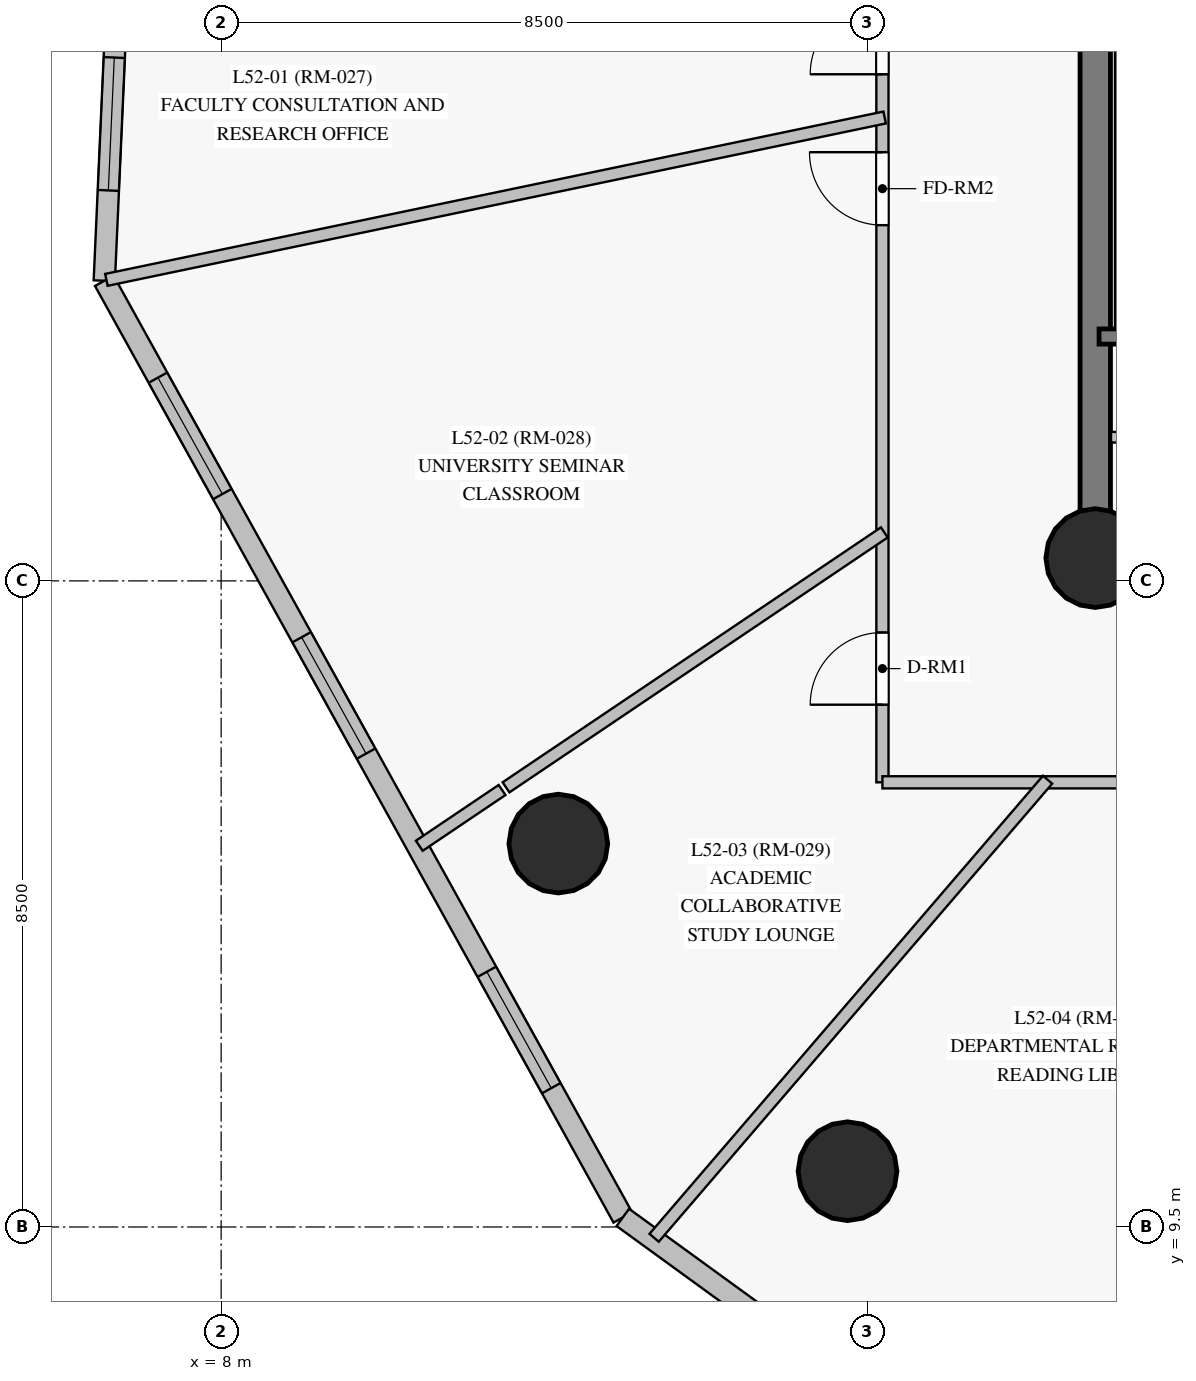
"""IFC4 building model, lengths in metres.
Left out: names, types, materials, properties, quantities, classifications, styles, units other than length and angle.
Written with IfcOpenShell. Run it as: python <this file> out.ifc"""

import sys

from ifc_helpers import new_model, si_unit, direction, frame, frame_2d, origin, origin_with_axes, origin_2d, place, context, subcontext, project, spatial, rectangle, circle, extrude, source, transform, mapped, element, fill, save


model = new_model("IFC4")
c1 = context("Model", 3, precision=1e-05, world=origin(), true_north=direction((0.0, 1.0)))
c2 = subcontext(c1, "Body", "Model", "MODEL_VIEW")
j1 = project(units=[si_unit("LENGTHUNIT", "METRE"), si_unit("PLANEANGLEUNIT", "RADIAN")], contexts=[c1])
p1 = place(None, origin())
s1 = spatial("IfcSite", under=j1, at=p1, CompositionType="ELEMENT")
p2 = place(p1, origin())
s2 = spatial("IfcBuilding", under=s1, at=p2, CompositionType="ELEMENT")
p3 = place(p2, frame((0.0, 0.0, 180.95)))
s3 = spatial("IfcBuildingStorey", under=s2, at=p3, CompositionType="ELEMENT", Elevation=180.95)
p4 = place(p3, frame((19.5, 18.3, 0.0), z_axis=(0.0, 0.0, 1.0), x_axis=(1.0, 0.0, 0.0)))
e1 = element("IfcWall", 1, at=p4, inside=s3, PredefinedType="SHEAR", context=c2, shape_type="SweptSolid", body=[
    extrude(rectangle(XDim=7.05, YDim=0.4, at=frame_2d((3.525, 0.0))), origin(), (0.0, 0.0, 1.0), 2.825),
])
p5 = place(p4, frame((4.2, 0.0, 0.0)))
e2 = element("IfcOpeningElement", 2, at=p5, cuts=e1, PredefinedType="OPENING", context=c2, shape_type="SweptSolid", body=[
    extrude(rectangle(XDim=1.4, YDim=2.2, at=frame_2d((0.7, 1.1))), frame((0.0, 0.21, 0.0), z_axis=(0.0, -1.0, 0.0), x_axis=(1.0, 0.0, 0.0)), (0.0, 0.0, 1.0), 0.42),
])
p6 = place(p3, frame((19.5, 34.7, 0.0), z_axis=(0.0, 0.0, 1.0), x_axis=(0.0, -1.0, 0.0)))
e3 = element("IfcWall", 3, at=p6, inside=s3, PredefinedType="SHEAR", context=c2, shape_type="SweptSolid", body=[
    extrude(rectangle(XDim=16.4, YDim=0.4, at=frame_2d((8.2, 0.0))), origin(), (0.0, 0.0, 1.0), 2.825),
])
p7 = place(p6, frame((3.1, 0.0, 0.0)))
e4 = element("IfcOpeningElement", 4, at=p7, cuts=e3, PredefinedType="OPENING", context=c2, shape_type="SweptSolid", body=[
    extrude(rectangle(XDim=1.1, YDim=2.15, at=frame_2d((0.55, 1.075))), frame((0.0, 0.21, 0.0), z_axis=(0.0, -1.0, 0.0), x_axis=(1.0, 0.0, 0.0)), (0.0, 0.0, 1.0), 0.42),
])
m1 = source(origin_with_axes(), c2, "Body", "SweptSolid", [
    extrude(circle(Radius=0.65, at=origin_2d()), origin(), (0.0, 0.0, 1.0), 3.05),
])
for number, where, z_axis, x_axis in (
    (5, (19.5, 18.3, 0.0), (0.0, 0.0, 1.0), (1.0, 0.0, 0.0)),
    (6, (12.436, 14.544, 0.0), (0.0, 0.0, 1.0), (1.0, 0.0, 0.0)),
    (7, (16.241, 10.234, 0.0), (0.0, 0.0, 1.0), (1.0, 0.0, 0.0)),
):
    element("IfcColumn", number, at=place(p3, frame(where, z_axis=z_axis, x_axis=x_axis)), inside=s3, PredefinedType="COLUMN", context=c2, shape_type="MappedRepresentation", body=[
        mapped(m1, transform((0.0, 0.0, 0.0), scale=1.0)),
    ])
p8 = place(p3, frame((6.957, 33.0, 0.0), z_axis=(0.0, 0.0, 1.0), x_axis=(-0.04466588637, -0.999001981277, 0.0)))
e8 = element("IfcWall", 8, at=p8, inside=s3, PredefinedType="SOLIDWALL", context=c2, shape_type="SweptSolid", body=[
    extrude(rectangle(XDim=11.063, YDim=0.28, at=frame_2d((5.531, 0.0))), origin(), (0.0, 0.0, 1.0), 2.825),
])
p9 = place(p8, frame((3.242, 0.0, 0.85)))
e9 = element("IfcOpeningElement", 9, at=p9, cuts=e8, PredefinedType="OPENING", context=c2, shape_type="SweptSolid", body=[
    extrude(rectangle(XDim=1.75, YDim=1.65, at=frame_2d((0.875, 0.825))), frame((0.0, 0.15, 0.0), z_axis=(0.0, -1.0, 0.0), x_axis=(1.0, 0.0, 0.0)), (0.0, 0.0, 1.0), 0.3),
])
p10 = place(p8, frame((8.123, 0.0, 0.85)))
e10 = element("IfcOpeningElement", 10, at=p10, cuts=e8, PredefinedType="OPENING", context=c2, shape_type="SweptSolid", body=[
    extrude(rectangle(XDim=1.75, YDim=1.65, at=frame_2d((0.875, 0.825))), frame((0.0, 0.15, 0.0), z_axis=(0.0, -1.0, 0.0), x_axis=(1.0, 0.0, 0.0)), (0.0, 0.0, 1.0), 0.3),
])
p11 = place(p3, frame((6.463, 21.948, 0.0), z_axis=(0.0, 0.0, 1.0), x_axis=(0.484331046547, -0.874884813762, 0.0)))
e11 = element("IfcWall", 11, at=p11, inside=s3, PredefinedType="SOLIDWALL", context=c2, shape_type="SweptSolid", body=[
    extrude(rectangle(XDim=14.084, YDim=0.28, at=frame_2d((7.042, 0.0))), origin(), (0.0, 0.0, 1.0), 2.825),
])
p12 = place(p11, frame((1.457, 0.0, 0.85)))
e12 = element("IfcOpeningElement", 12, at=p12, cuts=e11, PredefinedType="OPENING", context=c2, shape_type="SweptSolid", body=[
    extrude(rectangle(XDim=1.75, YDim=1.65, at=frame_2d((0.875, 0.825))), frame((0.0, 0.15, 0.0), z_axis=(0.0, -1.0, 0.0), x_axis=(1.0, 0.0, 0.0)), (0.0, 0.0, 1.0), 0.3),
])
p13 = place(p11, frame((5.36, 0.0, 0.85)))
e13 = element("IfcOpeningElement", 13, at=p13, cuts=e11, PredefinedType="OPENING", context=c2, shape_type="SweptSolid", body=[
    extrude(rectangle(XDim=1.75, YDim=1.65, at=frame_2d((0.875, 0.825))), frame((0.0, 0.15, 0.0), z_axis=(0.0, -1.0, 0.0), x_axis=(1.0, 0.0, 0.0)), (0.0, 0.0, 1.0), 0.3),
])
p14 = place(p11, frame((10.391, 0.0, 0.85)))
e14 = element("IfcOpeningElement", 14, at=p14, cuts=e11, PredefinedType="OPENING", context=c2, shape_type="SweptSolid", body=[
    extrude(rectangle(XDim=1.75, YDim=1.65, at=frame_2d((0.875, 0.825))), frame((0.0, 0.15, 0.0), z_axis=(0.0, -1.0, 0.0), x_axis=(1.0, 0.0, 0.0)), (0.0, 0.0, 1.0), 0.3),
])
p15 = place(p3, frame((13.284, 9.626, 0.0), z_axis=(0.0, 0.0, 1.0), x_axis=(0.8089753159, -0.587842613516, 0.0)))
e15 = element("IfcWall", 15, at=p15, inside=s3, PredefinedType="SOLIDWALL", context=c2, shape_type="SweptSolid", body=[
    extrude(rectangle(XDim=10.059, YDim=0.28, at=frame_2d((5.03, 0.0))), origin(), (0.0, 0.0, 1.0), 2.825),
])
p16 = place(p15, frame((3.076, 0.0, 0.85)))
e16 = element("IfcOpeningElement", 16, at=p16, cuts=e15, PredefinedType="OPENING", context=c2, shape_type="SweptSolid", body=[
    extrude(rectangle(XDim=1.75, YDim=1.65, at=frame_2d((0.875, 0.825))), frame((0.0, 0.15, 0.0), z_axis=(0.0, -1.0, 0.0), x_axis=(1.0, 0.0, 0.0)), (0.0, 0.0, 1.0), 0.3),
])
p17 = place(p15, frame((7.929, 0.0, 0.85)))
e17 = element("IfcOpeningElement", 17, at=p17, cuts=e15, PredefinedType="OPENING", context=c2, shape_type="SweptSolid", body=[
    extrude(rectangle(XDim=1.55, YDim=1.65, at=frame_2d((0.775, 0.825))), frame((0.0, 0.15, 0.0), z_axis=(0.0, -1.0, 0.0), x_axis=(1.0, 0.0, 0.0)), (0.0, 0.0, 1.0), 0.3),
])
p18 = place(p3, frame((19.55, 21.215, 0.0), z_axis=(0.0, 0.0, 1.0), x_axis=(1.0, 0.0, 0.0)))
e18 = element("IfcWall", 18, at=p18, inside=s3, PredefinedType="SHEAR", context=c2, shape_type="SweptSolid", body=[
    extrude(rectangle(XDim=3.995, YDim=0.2, at=frame_2d((1.998, 0.0))), origin(), (0.0, 0.0, 1.0), 2.825),
])
p19 = place(p3, frame((16.7, 15.35, 0.0), z_axis=(0.0, 0.0, 1.0), x_axis=(0.0, 1.0, 0.0)))
e19 = element("IfcWall", 19, at=p19, inside=s3, PredefinedType="PARTITIONING", context=c2, shape_type="SweptSolid", body=[
    extrude(rectangle(XDim=22.3, YDim=0.16, at=frame_2d((11.15, 0.0))), origin(), (0.0, 0.0, 1.0), 2.275),
])
p20 = place(p19, frame((9.315, 0.0, 0.0)))
e20 = element("IfcOpeningElement", 20, at=p20, cuts=e19, PredefinedType="OPENING", context=c2, shape_type="SweptSolid", body=[
    extrude(rectangle(XDim=0.95, YDim=2.15, at=frame_2d((0.475, 1.075))), frame((0.0, 0.09, 0.0), z_axis=(0.0, -1.0, 0.0), x_axis=(1.0, 0.0, 0.0)), (0.0, 0.0, 1.0), 0.18),
])
p21 = place(p19, frame((7.33, 0.0, 0.0)))
e21 = element("IfcOpeningElement", 21, at=p21, cuts=e19, PredefinedType="OPENING", context=c2, shape_type="SweptSolid", body=[
    extrude(rectangle(XDim=0.96, YDim=2.15, at=frame_2d((0.48, 1.075))), frame((0.0, 0.09, 0.0), z_axis=(0.0, -1.0, 0.0), x_axis=(1.0, 0.0, 0.0)), (0.0, 0.0, 1.0), 0.18),
])
p22 = place(p19, frame((1.021, 0.0, 0.0)))
e22 = element("IfcOpeningElement", 22, at=p22, cuts=e19, PredefinedType="OPENING", context=c2, shape_type="SweptSolid", body=[
    extrude(rectangle(XDim=0.95, YDim=2.15, at=frame_2d((0.475, 1.075))), frame((0.0, 0.09, 0.0), z_axis=(0.0, -1.0, 0.0), x_axis=(1.0, 0.0, 0.0)), (0.0, 0.0, 1.0), 0.18),
])
p23 = place(p19, frame((18.396, 0.0, 0.0)))
e23 = element("IfcOpeningElement", 23, at=p23, cuts=e19, PredefinedType="OPENING", context=c2, shape_type="SweptSolid", body=[
    extrude(rectangle(XDim=0.96, YDim=2.15, at=frame_2d((0.48, 1.075))), frame((0.0, 0.09, 0.0), z_axis=(0.0, -1.0, 0.0), x_axis=(1.0, 0.0, 0.0)), (0.0, 0.0, 1.0), 0.18),
])
p24 = place(p19, frame((14.36, 0.0, 0.0)))
e24 = element("IfcOpeningElement", 24, at=p24, cuts=e19, PredefinedType="OPENING", context=c2, shape_type="SweptSolid", body=[
    extrude(rectangle(XDim=0.96, YDim=2.15, at=frame_2d((0.48, 1.075))), frame((0.0, 0.09, 0.0), z_axis=(0.0, -1.0, 0.0), x_axis=(1.0, 0.0, 0.0)), (0.0, 0.0, 1.0), 0.18),
])
p25 = place(p19, frame((11.115, 0.0, 0.0)))
e25 = element("IfcOpeningElement", 25, at=p25, cuts=e19, PredefinedType="OPENING", context=c2, shape_type="SweptSolid", body=[
    extrude(rectangle(XDim=0.95, YDim=2.15, at=frame_2d((0.475, 1.075))), frame((0.0, 0.09, 0.0), z_axis=(0.0, -1.0, 0.0), x_axis=(1.0, 0.0, 0.0)), (0.0, 0.0, 1.0), 0.18),
])
p26 = place(p3, frame((23.645, 15.378, 0.0), z_axis=(0.0, 0.0, 1.0), x_axis=(-0.39550652106, -0.91846316845, 0.0)))
e26 = element("IfcWall", 26, at=p26, inside=s3, PredefinedType="PARTITIONING", context=c2, shape_type="SweptSolid", body=[
    extrude(rectangle(XDim=10.986, YDim=0.16, at=frame_2d((5.493, 0.0))), origin(), (0.0, 0.0, 1.0), 2.825),
])
p27 = place(p3, frame((27.55, 15.35, 0.0), z_axis=(0.0, 0.0, 1.0), x_axis=(-1.0, 0.0, 0.0)))
e27 = element("IfcWall", 27, at=p27, inside=s3, PredefinedType="PARTITIONING", context=c2, shape_type="SweptSolid", body=[
    extrude(rectangle(XDim=10.85, YDim=0.16, at=frame_2d((5.425, 0.0))), origin(), (0.0, 0.0, 1.0), 2.375),
])
p28 = place(p27, frame((4.95, 0.0, 0.0)))
e28 = element("IfcOpeningElement", 28, at=p28, cuts=e27, PredefinedType="OPENING", context=c2, shape_type="SweptSolid", body=[
    extrude(rectangle(XDim=0.95, YDim=2.15, at=frame_2d((0.475, 1.075))), frame((0.0, 0.09, 0.0), z_axis=(0.0, -1.0, 0.0), x_axis=(1.0, 0.0, 0.0)), (0.0, 0.0, 1.0), 0.18),
])
p29 = place(p27, frame((2.683, 0.0, 0.0)))
e29 = element("IfcOpeningElement", 29, at=p29, cuts=e27, PredefinedType="OPENING", context=c2, shape_type="SweptSolid", body=[
    extrude(rectangle(XDim=0.96, YDim=2.15, at=frame_2d((0.48, 1.075))), frame((0.0, 0.09, 0.0), z_axis=(0.0, -1.0, 0.0), x_axis=(1.0, 0.0, 0.0)), (0.0, 0.0, 1.0), 0.18),
])
p30 = place(p3, frame((16.729, 24.096, 0.0), z_axis=(0.0, 0.0, 1.0), x_axis=(-0.978925817261, -0.204216170515, 0.0)))
e30 = element("IfcWall", 30, at=p30, inside=s3, PredefinedType="PARTITIONING", context=c2, shape_type="SweptSolid", body=[
    extrude(rectangle(XDim=10.459, YDim=0.16, at=frame_2d((5.23, 0.0))), origin(), (0.0, 0.0, 1.0), 2.825),
])
p31 = place(p3, frame((18.873, 15.384, 0.0), z_axis=(0.0, 0.0, 1.0), x_axis=(-0.651578085273, -0.758581570295, 0.0)))
e31 = element("IfcWall", 31, at=p31, inside=s3, PredefinedType="PARTITIONING", context=c2, shape_type="SweptSolid", body=[
    extrude(rectangle(XDim=7.945, YDim=0.16, at=frame_2d((3.972, 0.0))), origin(), (0.0, 0.0, 1.0), 2.275),
])
p32 = place(p3, frame((16.725, 18.638, 0.0), z_axis=(0.0, 0.0, 1.0), x_axis=(-0.829279952389, -0.558833392493, 0.0)))
e32 = element("IfcWall", 32, at=p32, inside=s3, PredefinedType="PARTITIONING", context=c2, shape_type="SweptSolid", body=[
    extrude(rectangle(XDim=6.001, YDim=0.16, at=frame_2d((3.001, 0.0))), origin(), (0.0, 0.0, 1.0), 2.825),
])
p33 = place(p3, frame((19.707, 19.89, 0.0), z_axis=(0.0, 0.0, 1.0), x_axis=(1.0, 0.0, 0.0)))
e33 = element("IfcWall", 33, at=p33, inside=s3, PredefinedType="PARTITIONING", context=c2, shape_type="SweptSolid", body=[
    extrude(rectangle(XDim=3.79, YDim=0.14, at=frame_2d((1.895, 0.0))), origin(), (0.0, 0.0, 1.0), 2.825),
])
p34 = place(p3, frame((11.696, 15.249, 0.0), z_axis=(0.0, 0.0, 1.0), x_axis=(-0.829266427591, -0.558853462072, 0.0)))
e34 = element("IfcWall", 34, at=p34, inside=s3, PredefinedType="PARTITIONING", context=c2, shape_type="SweptSolid", body=[
    extrude(rectangle(XDim=1.314, YDim=0.16, at=frame_2d((0.657, 0.0))), origin(), (0.0, 0.0, 1.0), 2.825),
])
m2 = source(origin_with_axes(), c2, "Body", "SweptSolid", [
    extrude(rectangle(XDim=1.75, YDim=1.65, at=frame_2d((0.875, 0.825))), frame((0.0, 0.03, 0.0), z_axis=(0.0, -1.0, 0.0), x_axis=(1.0, 0.0, 0.0)), (0.0, 0.0, 1.0), 0.06),
])
p35 = place(p10, origin())
e35 = element("IfcWindow", 35, at=p35, inside=s3, PartitioningType="SINGLE_PANEL", PredefinedType="WINDOW", context=c2, shape_type="MappedRepresentation", body=[
    mapped(m2, transform((0.0, 0.0, 0.0), scale=1.0)),
])
fill(e10, e35)
p36 = place(p12, origin())
e36 = element("IfcWindow", 36, at=p36, inside=s3, PartitioningType="SINGLE_PANEL", PredefinedType="WINDOW", context=c2, shape_type="MappedRepresentation", body=[
    mapped(m2, transform((0.0, 0.0, 0.0), scale=1.0)),
])
fill(e12, e36)
p37 = place(p13, origin())
e37 = element("IfcWindow", 37, at=p37, inside=s3, PartitioningType="SINGLE_PANEL", PredefinedType="WINDOW", context=c2, shape_type="MappedRepresentation", body=[
    mapped(m2, transform((0.0, 0.0, 0.0), scale=1.0)),
])
fill(e13, e37)
p38 = place(p14, origin())
e38 = element("IfcWindow", 38, at=p38, inside=s3, PartitioningType="SINGLE_PANEL", PredefinedType="WINDOW", context=c2, shape_type="MappedRepresentation", body=[
    mapped(m2, transform((0.0, 0.0, 0.0), scale=1.0)),
])
fill(e14, e38)
m3 = source(origin_with_axes(), c2, "Body", "SweptSolid", [
    extrude(rectangle(XDim=0.95, YDim=2.15, at=frame_2d((0.475, 1.075))), frame((0.0, 0.025, 0.0), z_axis=(0.0, -1.0, 0.0), x_axis=(1.0, 0.0, 0.0)), (0.0, 0.0, 1.0), 0.05),
])
p39 = place(p20, origin())
e39 = element("IfcDoor", 39, at=p39, inside=s3, OperationType="SINGLE_SWING_LEFT", PredefinedType="DOOR", context=c2, shape_type="MappedRepresentation", body=[
    mapped(m3, transform((0.0, 0.0, 0.0), scale=1.0)),
])
fill(e20, e39)
m4 = source(origin_with_axes(), c2, "Body", "SweptSolid", [
    extrude(rectangle(XDim=0.96, YDim=2.15, at=frame_2d((0.48, 1.075))), frame((0.0, 0.025, 0.0), z_axis=(0.0, -1.0, 0.0), x_axis=(1.0, 0.0, 0.0)), (0.0, 0.0, 1.0), 0.05),
])
p40 = place(p21, origin())
e40 = element("IfcDoor", 40, at=p40, inside=s3, OperationType="SINGLE_SWING_RIGHT", PredefinedType="DOOR", context=c2, shape_type="MappedRepresentation", body=[
    mapped(m4, transform((0.0, 0.0, 0.0), scale=1.0)),
])
fill(e21, e40)
p41 = place(p22, origin())
e41 = element("IfcDoor", 41, at=p41, inside=s3, OperationType="SINGLE_SWING_LEFT", PredefinedType="DOOR", context=c2, shape_type="MappedRepresentation", body=[
    mapped(m3, transform((0.0, 0.0, 0.0), scale=1.0)),
])
fill(e22, e41)
save(model, sys.argv[1])
